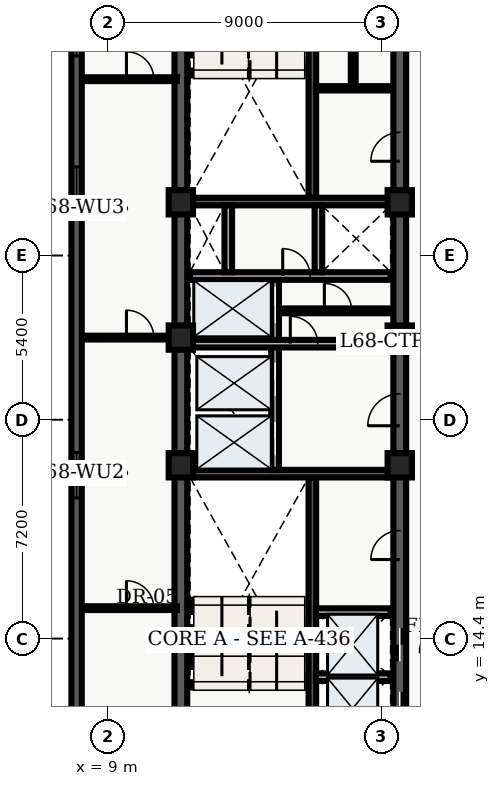
"""IFC4 building model, lengths in metres.
Left out: names, types, materials, properties, quantities, classifications, styles, units other than length and angle.
Written with IfcOpenShell. Run it as: python <this file> out.ifc"""

import sys

from ifc_helpers import new_model, entity, si_unit, converted_unit, direction, frame, origin_with_axes, origin_2d_with_axis, place, context, subcontext, project, spatial, polyline, rectangle, outline, extrude, element, fill, save


model = new_model("IFC4")
c1 = context("Model", 3, precision=1e-05, world=origin_with_axes(), true_north=direction((0.0, 1.0)))
c2 = subcontext(c1, "Body", "Model", "MODEL_VIEW")
j1 = project(units=[si_unit("LENGTHUNIT", "METRE"), converted_unit("PLANEANGLEUNIT", "DEGREE", entity("IfcPlaneAngleMeasure", 0.017), si_unit("PLANEANGLEUNIT", "RADIAN"), dimensions=[0, 0, 0, 0, 0, 0, 0])], contexts=[c1])
p1 = place(None, origin_with_axes())
s1 = spatial("IfcSite", under=j1, at=p1, CompositionType="ELEMENT")
p2 = place(p1, origin_with_axes())
s2 = spatial("IfcBuilding", under=s1, at=p2, CompositionType="ELEMENT")
p3 = place(p2, frame((0.0, 0.0, 276.3), z_axis=(0.0, 0.0, 1.0), x_axis=(1.0, 0.0, 0.0)))
s3 = spatial("IfcBuildingStorey", under=s2, at=p3, CompositionType="ELEMENT", Elevation=276.3)
p4 = place(p3, frame((11.4, 10.8, 0.0), z_axis=(0.0, 0.0, 1.0), x_axis=(0.0, 1.0, 0.0)))
e1 = element("IfcWall", 1, at=p4, inside=s3, PredefinedType="SHEAR", context=c2, shape_type="SweptSolid", body=[
    extrude(outline(polyline([(0.0, -0.21), (27.0, -0.21), (27.0, 0.21), (0.0, 0.21), (0.0, -0.21)])), origin_with_axes(), (0.0, 0.0, 1.0), 3.66),
])
p5 = place(p3, frame((18.6, 10.8, 0.0), z_axis=(0.0, 0.0, 1.0), x_axis=(0.0, 1.0, 0.0)))
e2 = element("IfcWall", 2, at=p5, inside=s3, PredefinedType="SHEAR", context=c2, shape_type="SweptSolid", body=[
    extrude(outline(polyline([(0.0, -0.21), (13.5, -0.21), (13.5, 0.21), (0.0, 0.21), (0.0, -0.21)])), origin_with_axes(), (0.0, 0.0, 1.0), 3.66),
])
p6 = place(p5, frame((1.3, 0.0, 0.0), z_axis=(0.0, 0.0, 1.0), x_axis=(1.0, 0.0, 0.0)))
e3 = element("IfcOpeningElement", 3, at=p6, cuts=e2, PredefinedType="OPENING", context=c2, shape_type="SweptSolid", body=[
    extrude(rectangle(XDim=1.1, YDim=0.44, at=origin_2d_with_axis()), origin_with_axes(), (0.0, 0.0, 1.0), 2.15),
])
p7 = place(p5, frame((3.4, 0.0, 0.0), z_axis=(0.0, 0.0, 1.0), x_axis=(1.0, 0.0, 0.0)))
e4 = element("IfcOpeningElement", 4, at=p7, cuts=e2, PredefinedType="OPENING", context=c2, shape_type="SweptSolid", body=[
    extrude(rectangle(XDim=1.1, YDim=0.44, at=origin_2d_with_axis()), origin_with_axes(), (0.0, 0.0, 1.0), 2.15),
])
p8 = place(p5, frame((11.125, 0.0, 0.0), z_axis=(0.0, 0.0, 1.0), x_axis=(1.0, 0.0, 0.0)))
e5 = element("IfcOpeningElement", 5, at=p8, cuts=e2, PredefinedType="OPENING", context=c2, shape_type="SweptSolid", body=[
    extrude(rectangle(XDim=1.05, YDim=0.44, at=origin_2d_with_axis()), origin_with_axes(), (0.0, 0.0, 1.0), 2.15),
])
p9 = place(p5, frame((6.675, 0.0, 0.0), z_axis=(0.0, 0.0, 1.0), x_axis=(1.0, 0.0, 0.0)))
e6 = element("IfcOpeningElement", 6, at=p9, cuts=e2, PredefinedType="OPENING", context=c2, shape_type="SweptSolid", body=[
    extrude(rectangle(XDim=0.95, YDim=0.44, at=origin_2d_with_axis()), origin_with_axes(), (0.0, 0.0, 1.0), 2.15),
])
p10 = place(p3, frame((18.6, 24.3, 0.0), z_axis=(0.0, 0.0, 1.0), x_axis=(0.0, 1.0, 0.0)))
e7 = element("IfcWall", 7, at=p10, inside=s3, PredefinedType="SHEAR", context=c2, shape_type="SweptSolid", body=[
    extrude(outline(polyline([(0.0, -0.21), (13.5, -0.21), (13.5, 0.21), (0.0, 0.21), (0.0, -0.21)])), origin_with_axes(), (0.0, 0.0, 1.0), 3.66),
])
p11 = place(p10, frame((6.275, 0.0, 0.0), z_axis=(0.0, 0.0, 1.0), x_axis=(1.0, 0.0, 0.0)))
e8 = element("IfcOpeningElement", 8, at=p11, cuts=e7, PredefinedType="OPENING", context=c2, shape_type="SweptSolid", body=[
    extrude(rectangle(XDim=0.95, YDim=0.44, at=origin_2d_with_axis()), origin_with_axes(), (0.0, 0.0, 1.0), 2.15),
])
p12 = place(p10, frame((10.875, 0.0, 0.0), z_axis=(0.0, 0.0, 1.0), x_axis=(1.0, 0.0, 0.0)))
e9 = element("IfcOpeningElement", 9, at=p12, cuts=e7, PredefinedType="OPENING", context=c2, shape_type="SweptSolid", body=[
    extrude(rectangle(XDim=0.95, YDim=0.44, at=origin_2d_with_axis()), origin_with_axes(), (0.0, 0.0, 1.0), 2.15),
])
p13 = place(p3, frame((15.725, 11.01, 0.0), z_axis=(0.0, 0.0, 1.0), x_axis=(0.0, 1.0, 0.0)))
e10 = element("IfcWall", 10, at=p13, inside=s3, PredefinedType="SHEAR", context=c2, shape_type="SweptSolid", body=[
    extrude(outline(polyline([(0.0, -0.125), (8.69, -0.125), (8.69, 0.125), (0.0, 0.125), (0.0, -0.125)])), origin_with_axes(), (0.0, 0.0, 1.0), 3.66),
])
p14 = place(p3, frame((11.61, 19.825, 0.0), z_axis=(0.0, 0.0, 1.0), x_axis=(1.0, 0.0, 0.0)))
e11 = element("IfcWall", 11, at=p14, inside=s3, PredefinedType="SHEAR", context=c2, shape_type="SweptSolid", body=[
    extrude(outline(polyline([(0.0, -0.125), (6.78, -0.125), (6.78, 0.125), (0.0, 0.125), (0.0, -0.125)])), origin_with_axes(), (0.0, 0.0, 1.0), 3.66),
])
p15 = place(p3, frame((15.725, 28.9, 0.0), z_axis=(0.0, 0.0, 1.0), x_axis=(0.0, 1.0, 0.0)))
e12 = element("IfcWall", 12, at=p15, inside=s3, PredefinedType="SHEAR", context=c2, shape_type="SweptSolid", body=[
    extrude(outline(polyline([(0.0, -0.125), (8.69, -0.125), (8.69, 0.125), (0.0, 0.125), (0.0, -0.125)])), origin_with_axes(), (0.0, 0.0, 1.0), 3.66),
])
p16 = place(p3, frame((11.61, 28.775, 0.0), z_axis=(0.0, 0.0, 1.0), x_axis=(1.0, 0.0, 0.0)))
e13 = element("IfcWall", 13, at=p16, inside=s3, PredefinedType="SHEAR", context=c2, shape_type="SweptSolid", body=[
    extrude(outline(polyline([(0.0, -0.125), (6.78, -0.125), (6.78, 0.125), (0.0, 0.125), (0.0, -0.125)])), origin_with_axes(), (0.0, 0.0, 1.0), 3.66),
])
p17 = place(p3, frame((14.5, 19.95, 0.0), z_axis=(0.0, 0.0, 1.0), x_axis=(0.0, 1.0, 0.0)))
e14 = element("IfcWall", 14, at=p17, inside=s3, PredefinedType="SOLIDWALL", context=c2, shape_type="SweptSolid", body=[
    extrude(outline(polyline([(0.0, -0.125), (6.25, -0.125), (6.25, 0.125), (0.0, 0.125), (0.0, -0.125)])), origin_with_axes(), (0.0, 0.0, 1.0), 2.7),
])
p18 = place(p17, frame((1.025, 0.0, 0.0), z_axis=(0.0, 0.0, 1.0), x_axis=(1.0, 0.0, 0.0)))
e15 = element("IfcOpeningElement", 15, at=p18, cuts=e14, PredefinedType="OPENING", context=c2, shape_type="SweptSolid", body=[
    extrude(rectangle(XDim=1.1, YDim=0.27, at=origin_2d_with_axis()), origin_with_axes(), (0.0, 0.0, 1.0), 2.15),
])
p19 = place(p17, frame((2.975, 0.0, 0.0), z_axis=(0.0, 0.0, 1.0), x_axis=(1.0, 0.0, 0.0)))
e16 = element("IfcOpeningElement", 16, at=p19, cuts=e14, PredefinedType="OPENING", context=c2, shape_type="SweptSolid", body=[
    extrude(rectangle(XDim=1.1, YDim=0.27, at=origin_2d_with_axis()), origin_with_axes(), (0.0, 0.0, 1.0), 2.15),
])
p20 = place(p17, frame((5.425, 0.0, 0.0), z_axis=(0.0, 0.0, 1.0), x_axis=(1.0, 0.0, 0.0)))
e17 = element("IfcOpeningElement", 17, at=p20, cuts=e14, PredefinedType="OPENING", context=c2, shape_type="SweptSolid", body=[
    extrude(rectangle(XDim=1.2, YDim=0.27, at=origin_2d_with_axis()), origin_with_axes(), (0.0, 0.0, 1.0), 2.15),
])
p21 = place(p3, frame((11.7, 24.1, 0.0), z_axis=(0.0, 0.0, 1.0), x_axis=(1.0, 0.0, 0.0)))
e18 = element("IfcWall", 18, at=p21, inside=s3, PredefinedType="SOLIDWALL", context=c2, shape_type="SweptSolid", body=[
    extrude(outline(polyline([(0.0, -0.125), (6.6, -0.125), (6.6, 0.125), (0.0, 0.125), (0.0, -0.125)])), origin_with_axes(), (0.0, 0.0, 1.0), 2.7),
])
p22 = place(p21, frame((3.75, 0.0, 0.0), z_axis=(0.0, 0.0, 1.0), x_axis=(1.0, 0.0, 0.0)))
e19 = element("IfcOpeningElement", 19, at=p22, cuts=e18, PredefinedType="OPENING", context=c2, shape_type="SweptSolid", body=[
    extrude(rectangle(XDim=0.9, YDim=0.27, at=origin_2d_with_axis()), origin_with_axes(), (0.0, 0.0, 1.0), 2.15),
])
p23 = place(p3, frame((11.7, 26.325, 0.0), z_axis=(0.0, 0.0, 1.0), x_axis=(1.0, 0.0, 0.0)))
e20 = element("IfcWall", 20, at=p23, inside=s3, PredefinedType="SOLIDWALL", context=c2, shape_type="SweptSolid", body=[
    extrude(outline(polyline([(0.0, -0.125), (6.6, -0.125), (6.6, 0.125), (0.0, 0.125), (0.0, -0.125)])), origin_with_axes(), (0.0, 0.0, 1.0), 2.7),
])
p24 = place(p23, frame((3.5, 0.0, 0.0), z_axis=(0.0, 0.0, 1.0), x_axis=(1.0, 0.0, 0.0)))
e21 = element("IfcOpeningElement", 21, at=p24, cuts=e20, PredefinedType="OPENING", context=c2, shape_type="SweptSolid", body=[
    extrude(rectangle(XDim=0.9, YDim=0.27, at=origin_2d_with_axis()), origin_with_axes(), (0.0, 0.0, 1.0), 2.15),
])
for number, where, z_axis, x_axis in (
    (22, (12.96, 26.45, 0.0), (0.0, 0.0, 1.0), (0.0, 1.0, 0.0)),
    (23, (15.925, 26.45, 0.0), (0.0, 0.0, 1.0), (0.0, 1.0, 0.0)),
):
    element("IfcWall", number, at=place(p3, frame(where, z_axis=z_axis, x_axis=x_axis)), inside=s3, PredefinedType="SOLIDWALL", context=c2, shape_type="SweptSolid", body=[
        extrude(outline(polyline([(0.0, -0.125), (2.2, -0.125), (2.2, 0.125), (0.0, 0.125), (0.0, -0.125)])), origin_with_axes(), (0.0, 0.0, 1.0), 2.7),
    ])
for number, where, z_axis, x_axis in (
    (24, (11.4, 20.1, 0.0), (0.0, 0.0, 1.0), (1.0, 0.0, 0.0)),
    (25, (11.4, 24.3, 0.0), (0.0, 0.0, 1.0), (1.0, 0.0, 0.0)),
    (26, (11.4, 28.75, 0.0), (0.0, 0.0, 1.0), (1.0, 0.0, 0.0)),
    (27, (18.6, 20.1, 0.0), (0.0, 0.0, 1.0), (1.0, 0.0, 0.0)),
    (28, (18.6, 24.3, 0.0), (0.0, 0.0, 1.0), (1.0, 0.0, 0.0)),
    (29, (18.6, 28.75, 0.0), (0.0, 0.0, 1.0), (1.0, 0.0, 0.0)),
):
    element("IfcColumn", number, at=place(p3, frame(where, z_axis=z_axis, x_axis=x_axis)), inside=s3, PredefinedType="COLUMN", context=c2, shape_type="SweptSolid", body=[
        extrude(rectangle(XDim=0.8, YDim=0.8, at=origin_2d_with_axis()), origin_with_axes(), (0.0, 0.0, 1.0), 3.9),
    ])
p25 = place(p3, frame((14.62, 25.18, 0.0), z_axis=(0.0, 0.0, 1.0), x_axis=(1.0, 0.0, 0.0)))
e30 = element("IfcWall", 30, at=p25, inside=s3, PredefinedType="PARTITIONING", context=c2, shape_type="SweptSolid", body=[
    extrude(outline(polyline([(0.0, -0.08), (3.68, -0.08), (3.68, 0.08), (0.0, 0.08), (0.0, -0.08)])), origin_with_axes(), (0.0, 0.0, 1.0), 2.7),
])
p26 = place(p25, frame((1.95, 0.0, 0.0), z_axis=(0.0, 0.0, 1.0), x_axis=(1.0, 0.0, 0.0)))
e31 = element("IfcOpeningElement", 31, at=p26, cuts=e30, PredefinedType="OPENING", context=c2, shape_type="SweptSolid", body=[
    extrude(rectangle(XDim=0.9, YDim=0.18, at=origin_2d_with_axis()), origin_with_axes(), (0.0, 0.0, 1.0), 2.15),
])
for number, where, z_axis, x_axis in (
    (32, (15.84, 13.13, 0.0), (0.0, 0.0, 1.0), (1.0, 0.0, 0.0)),
    (33, (15.84, 15.27, 0.0), (0.0, 0.0, 1.0), (1.0, 0.0, 0.0)),
):
    element("IfcWall", number, at=place(p3, frame(where, z_axis=z_axis, x_axis=x_axis)), inside=s3, PredefinedType="SOLIDWALL", context=c2, shape_type="SweptSolid", body=[
        extrude(outline(polyline([(0.0, -0.125), (2.46, -0.125), (2.46, 0.125), (0.0, 0.125), (0.0, -0.125)])), origin_with_axes(), (0.0, 0.0, 1.0), 2.7),
    ])
p27 = place(p3, frame((15.84, 32.5, 0.0), z_axis=(0.0, 0.0, 1.0), x_axis=(1.0, 0.0, 0.0)))
e34 = element("IfcWall", 34, at=p27, inside=s3, PredefinedType="PARTITIONING", context=c2, shape_type="SweptSolid", body=[
    extrude(outline(polyline([(0.0, -0.07), (2.46, -0.07), (2.46, 0.07), (0.0, 0.07), (0.0, -0.07)])), origin_with_axes(), (0.0, 0.0, 1.0), 2.7),
])
p28 = place(p3, frame((17.07, 32.58, 0.0), z_axis=(0.0, 0.0, 1.0), x_axis=(0.0, 1.0, 0.0)))
e35 = element("IfcWall", 35, at=p28, inside=s3, PredefinedType="PARTITIONING", context=c2, shape_type="SweptSolid", body=[
    extrude(outline(polyline([(0.0, -0.08), (4.92, -0.08), (4.92, 0.08), (0.0, 0.08), (0.0, -0.08)])), origin_with_axes(), (0.0, 0.0, 1.0), 2.7),
])
p29 = place(p28, frame((2.45, 0.0, 0.0), z_axis=(0.0, 0.0, 1.0), x_axis=(1.0, 0.0, 0.0)))
e36 = element("IfcOpeningElement", 36, at=p29, cuts=e35, PredefinedType="OPENING", context=c2, shape_type="SweptSolid", body=[
    extrude(rectangle(XDim=0.9, YDim=0.18, at=origin_2d_with_axis()), origin_with_axes(), (0.0, 0.0, 1.0), 2.15),
])
p30 = place(p3, frame((8.135, 15.4, 0.0), z_axis=(0.0, 0.0, 1.0), x_axis=(1.0, 0.0, 0.0)))
e37 = element("IfcWall", 37, at=p30, inside=s3, PredefinedType="PARTITIONING", context=c2, shape_type="SweptSolid", body=[
    extrude(outline(polyline([(0.0, -0.062), (3.135, -0.062), (3.135, 0.062), (0.0, 0.062), (0.0, -0.062)])), origin_with_axes(), (0.0, 0.0, 1.0), 2.7),
])
p31 = place(p30, frame((1.925, 0.0, 0.0), z_axis=(0.0, 0.0, 1.0), x_axis=(1.0, 0.0, 0.0)))
e38 = element("IfcOpeningElement", 38, at=p31, cuts=e37, PredefinedType="OPENING", context=c2, shape_type="SweptSolid", body=[
    extrude(rectangle(XDim=0.9, YDim=0.145, at=origin_2d_with_axis()), origin_with_axes(), (0.0, 0.0, 1.0), 2.15),
])
p32 = place(p3, frame((8.135, 24.3, 0.0), z_axis=(0.0, 0.0, 1.0), x_axis=(1.0, 0.0, 0.0)))
e39 = element("IfcWall", 39, at=p32, inside=s3, PredefinedType="PARTITIONING", context=c2, shape_type="SweptSolid", body=[
    extrude(outline(polyline([(0.0, -0.062), (3.135, -0.062), (3.135, 0.062), (0.0, 0.062), (0.0, -0.062)])), origin_with_axes(), (0.0, 0.0, 1.0), 2.7),
])
p33 = place(p32, frame((1.925, 0.0, 0.0), z_axis=(0.0, 0.0, 1.0), x_axis=(1.0, 0.0, 0.0)))
e40 = element("IfcOpeningElement", 40, at=p33, cuts=e39, PredefinedType="OPENING", context=c2, shape_type="SweptSolid", body=[
    extrude(rectangle(XDim=0.9, YDim=0.145, at=origin_2d_with_axis()), origin_with_axes(), (0.0, 0.0, 1.0), 2.15),
])
p34 = place(p3, frame((8.135, 32.8, 0.0), z_axis=(0.0, 0.0, 1.0), x_axis=(1.0, 0.0, 0.0)))
e41 = element("IfcWall", 41, at=p34, inside=s3, PredefinedType="PARTITIONING", context=c2, shape_type="SweptSolid", body=[
    extrude(outline(polyline([(0.0, -0.062), (3.135, -0.062), (3.135, 0.062), (0.0, 0.062), (0.0, -0.062)])), origin_with_axes(), (0.0, 0.0, 1.0), 2.7),
])
p35 = place(p34, frame((1.925, 0.0, 0.0), z_axis=(0.0, 0.0, 1.0), x_axis=(1.0, 0.0, 0.0)))
e42 = element("IfcOpeningElement", 42, at=p35, cuts=e41, PredefinedType="OPENING", context=c2, shape_type="SweptSolid", body=[
    extrude(rectangle(XDim=0.9, YDim=0.145, at=origin_2d_with_axis()), origin_with_axes(), (0.0, 0.0, 1.0), 2.15),
])
p36 = place(p3, frame((7.97, 2.74, 0.0), z_axis=(0.0, 0.0, 1.0), x_axis=(0.0, 1.0, 0.0)))
e43 = element("IfcWall", 43, at=p36, inside=s3, PredefinedType="SOLIDWALL", context=c2, shape_type="SweptSolid", body=[
    extrude(outline(polyline([(0.0, -0.17), (43.46, -0.17), (43.46, 0.17), (0.0, 0.17), (0.0, -0.17)])), origin_with_axes(), (0.0, 0.0, 1.0), 3.66),
])
p37 = place(p36, frame((2.948, 0.0, 0.45), z_axis=(0.0, 0.0, 1.0), x_axis=(1.0, 0.0, 0.0)))
e44 = element("IfcOpeningElement", 44, at=p37, cuts=e43, PredefinedType="OPENING", context=c2, shape_type="SweptSolid", body=[
    extrude(rectangle(XDim=1.5, YDim=0.36, at=origin_2d_with_axis()), origin_with_axes(), (0.0, 0.0, 1.0), 2.1),
])
p38 = place(p36, frame((7.643, 0.0, 0.45), z_axis=(0.0, 0.0, 1.0), x_axis=(1.0, 0.0, 0.0)))
e45 = element("IfcOpeningElement", 45, at=p38, cuts=e43, PredefinedType="OPENING", context=c2, shape_type="SweptSolid", body=[
    extrude(rectangle(XDim=1.5, YDim=0.36, at=origin_2d_with_axis()), origin_with_axes(), (0.0, 0.0, 1.0), 2.1),
])
p39 = place(p36, frame((17.034, 0.0, 0.45), z_axis=(0.0, 0.0, 1.0), x_axis=(1.0, 0.0, 0.0)))
e46 = element("IfcOpeningElement", 46, at=p39, cuts=e43, PredefinedType="OPENING", context=c2, shape_type="SweptSolid", body=[
    extrude(rectangle(XDim=1.5, YDim=0.36, at=origin_2d_with_axis()), origin_with_axes(), (0.0, 0.0, 1.0), 2.1),
])
p40 = place(p36, frame((26.426, 0.0, 0.45), z_axis=(0.0, 0.0, 1.0), x_axis=(1.0, 0.0, 0.0)))
e47 = element("IfcOpeningElement", 47, at=p40, cuts=e43, PredefinedType="OPENING", context=c2, shape_type="SweptSolid", body=[
    extrude(rectangle(XDim=1.5, YDim=0.36, at=origin_2d_with_axis()), origin_with_axes(), (0.0, 0.0, 1.0), 2.1),
])
p41 = place(p36, frame((31.571, 0.0, 0.45), z_axis=(0.0, 0.0, 1.0), x_axis=(1.0, 0.0, 0.0)))
e48 = element("IfcOpeningElement", 48, at=p41, cuts=e43, PredefinedType="OPENING", context=c2, shape_type="SweptSolid", body=[
    extrude(rectangle(XDim=1.5, YDim=0.36, at=origin_2d_with_axis()), origin_with_axes(), (0.0, 0.0, 1.0), 2.1),
])
p42 = place(p36, frame((35.817, 0.0, 0.45), z_axis=(0.0, 0.0, 1.0), x_axis=(1.0, 0.0, 0.0)))
e49 = element("IfcOpeningElement", 49, at=p42, cuts=e43, PredefinedType="OPENING", context=c2, shape_type="SweptSolid", body=[
    extrude(rectangle(XDim=1.5, YDim=0.36, at=origin_2d_with_axis()), origin_with_axes(), (0.0, 0.0, 1.0), 2.1),
])
p43 = place(p36, frame((40.512, 0.0, 0.45), z_axis=(0.0, 0.0, 1.0), x_axis=(1.0, 0.0, 0.0)))
e50 = element("IfcOpeningElement", 50, at=p43, cuts=e43, PredefinedType="OPENING", context=c2, shape_type="SweptSolid", body=[
    extrude(rectangle(XDim=1.5, YDim=0.36, at=origin_2d_with_axis()), origin_with_axes(), (0.0, 0.0, 1.0), 2.1),
])
p44 = place(p5, frame((1.3, 0.0, 0.0), z_axis=(0.0, 0.0, 1.0), x_axis=(1.0, 0.0, 0.0)))
e51 = element("IfcDoor", 51, at=p44, inside=s3, OperationType="SLIDING_TO_LEFT", PredefinedType="DOOR", context=c2, shape_type="SweptSolid", body=[
    extrude(rectangle(XDim=1.1, YDim=0.09, at=origin_2d_with_axis()), origin_with_axes(), (0.0, 0.0, 1.0), 2.15),
])
fill(e3, e51)
p45 = place(p5, frame((3.4, 0.0, 0.0), z_axis=(0.0, 0.0, 1.0), x_axis=(1.0, 0.0, 0.0)))
e52 = element("IfcDoor", 52, at=p45, inside=s3, OperationType="SLIDING_TO_RIGHT", PredefinedType="DOOR", context=c2, shape_type="SweptSolid", body=[
    extrude(rectangle(XDim=1.1, YDim=0.09, at=origin_2d_with_axis()), origin_with_axes(), (0.0, 0.0, 1.0), 2.15),
])
fill(e4, e52)
p46 = place(p17, frame((1.025, 0.0, 0.0), z_axis=(0.0, 0.0, 1.0), x_axis=(1.0, 0.0, 0.0)))
e53 = element("IfcDoor", 53, at=p46, inside=s3, OperationType="SLIDING_TO_LEFT", PredefinedType="DOOR", context=c2, shape_type="SweptSolid", body=[
    extrude(rectangle(XDim=1.1, YDim=0.09, at=origin_2d_with_axis()), origin_with_axes(), (0.0, 0.0, 1.0), 2.15),
])
fill(e15, e53)
p47 = place(p17, frame((2.975, 0.0, 0.0), z_axis=(0.0, 0.0, 1.0), x_axis=(1.0, 0.0, 0.0)))
e54 = element("IfcDoor", 54, at=p47, inside=s3, OperationType="SLIDING_TO_RIGHT", PredefinedType="DOOR", context=c2, shape_type="SweptSolid", body=[
    extrude(rectangle(XDim=1.1, YDim=0.09, at=origin_2d_with_axis()), origin_with_axes(), (0.0, 0.0, 1.0), 2.15),
])
fill(e16, e54)
p48 = place(p17, frame((5.425, 0.0, 0.0), z_axis=(0.0, 0.0, 1.0), x_axis=(1.0, 0.0, 0.0)))
e55 = element("IfcDoor", 55, at=p48, inside=s3, OperationType="DOUBLE_DOOR_SLIDING", PredefinedType="DOOR", context=c2, shape_type="SweptSolid", body=[
    extrude(rectangle(XDim=1.2, YDim=0.09, at=origin_2d_with_axis()), origin_with_axes(), (0.0, 0.0, 1.0), 2.15),
])
fill(e17, e55)
p49 = place(p5, frame((11.125, 0.0, 0.0), z_axis=(0.0, 0.0, 1.0), x_axis=(1.0, 0.0, 0.0)))
e56 = element("IfcDoor", 56, at=p49, inside=s3, OperationType="SINGLE_SWING_LEFT", PredefinedType="DOOR", context=c2, shape_type="SweptSolid", body=[
    extrude(rectangle(XDim=1.05, YDim=0.09, at=origin_2d_with_axis()), origin_with_axes(), (0.0, 0.0, 1.0), 2.15),
])
fill(e5, e56)
p50 = place(p23, frame((3.5, 0.0, 0.0), z_axis=(0.0, 0.0, 1.0), x_axis=(1.0, 0.0, 0.0)))
e57 = element("IfcDoor", 57, at=p50, inside=s3, OperationType="SINGLE_SWING_LEFT", PredefinedType="DOOR", context=c2, shape_type="SweptSolid", body=[
    extrude(rectangle(XDim=0.9, YDim=0.09, at=origin_2d_with_axis()), origin_with_axes(), (0.0, 0.0, 1.0), 2.15),
])
fill(e21, e57)
p51 = place(p21, frame((3.75, 0.0, 0.0), z_axis=(0.0, 0.0, 1.0), x_axis=(1.0, 0.0, 0.0)))
e58 = element("IfcDoor", 58, at=p51, inside=s3, OperationType="SINGLE_SWING_LEFT", PredefinedType="DOOR", context=c2, shape_type="SweptSolid", body=[
    extrude(rectangle(XDim=0.9, YDim=0.09, at=origin_2d_with_axis()), origin_with_axes(), (0.0, 0.0, 1.0), 2.15),
])
fill(e19, e58)
p52 = place(p25, frame((1.95, 0.0, 0.0), z_axis=(0.0, 0.0, 1.0), x_axis=(1.0, 0.0, 0.0)))
e59 = element("IfcDoor", 59, at=p52, inside=s3, OperationType="SINGLE_SWING_LEFT", PredefinedType="DOOR", context=c2, shape_type="SweptSolid", body=[
    extrude(rectangle(XDim=0.9, YDim=0.09, at=origin_2d_with_axis()), origin_with_axes(), (0.0, 0.0, 1.0), 2.15),
])
fill(e31, e59)
p53 = place(p5, frame((6.675, 0.0, 0.0), z_axis=(0.0, 0.0, 1.0), x_axis=(1.0, 0.0, 0.0)))
e60 = element("IfcDoor", 60, at=p53, inside=s3, OperationType="SINGLE_SWING_LEFT", PredefinedType="DOOR", context=c2, shape_type="SweptSolid", body=[
    extrude(rectangle(XDim=0.95, YDim=0.09, at=origin_2d_with_axis()), origin_with_axes(), (0.0, 0.0, 1.0), 2.15),
])
fill(e6, e60)
p54 = place(p10, frame((6.275, 0.0, 0.0), z_axis=(0.0, 0.0, 1.0), x_axis=(1.0, 0.0, 0.0)))
e61 = element("IfcDoor", 61, at=p54, inside=s3, OperationType="SINGLE_SWING_LEFT", PredefinedType="DOOR", context=c2, shape_type="SweptSolid", body=[
    extrude(rectangle(XDim=0.95, YDim=0.09, at=origin_2d_with_axis()), origin_with_axes(), (0.0, 0.0, 1.0), 2.15),
])
fill(e8, e61)
p55 = place(p30, frame((1.925, 0.0, 0.0), z_axis=(0.0, 0.0, 1.0), x_axis=(1.0, 0.0, 0.0)))
e62 = element("IfcDoor", 62, at=p55, inside=s3, OperationType="SINGLE_SWING_LEFT", PredefinedType="DOOR", context=c2, shape_type="SweptSolid", body=[
    extrude(rectangle(XDim=0.9, YDim=0.075, at=origin_2d_with_axis()), origin_with_axes(), (0.0, 0.0, 1.0), 2.15),
])
fill(e38, e62)
p56 = place(p32, frame((1.925, 0.0, 0.0), z_axis=(0.0, 0.0, 1.0), x_axis=(1.0, 0.0, 0.0)))
e63 = element("IfcDoor", 63, at=p56, inside=s3, OperationType="SINGLE_SWING_LEFT", PredefinedType="DOOR", context=c2, shape_type="SweptSolid", body=[
    extrude(rectangle(XDim=0.9, YDim=0.075, at=origin_2d_with_axis()), origin_with_axes(), (0.0, 0.0, 1.0), 2.15),
])
fill(e40, e63)
p57 = place(p34, frame((1.925, 0.0, 0.0), z_axis=(0.0, 0.0, 1.0), x_axis=(1.0, 0.0, 0.0)))
e64 = element("IfcDoor", 64, at=p57, inside=s3, OperationType="SINGLE_SWING_LEFT", PredefinedType="DOOR", context=c2, shape_type="SweptSolid", body=[
    extrude(rectangle(XDim=0.9, YDim=0.075, at=origin_2d_with_axis()), origin_with_axes(), (0.0, 0.0, 1.0), 2.15),
])
fill(e42, e64)
p58 = place(p36, frame((17.034, 0.0, 0.45), z_axis=(0.0, 0.0, 1.0), x_axis=(1.0, 0.0, 0.0)))
e65 = element("IfcWindow", 65, at=p58, inside=s3, PredefinedType="WINDOW", context=c2, shape_type="SweptSolid", body=[
    extrude(rectangle(XDim=1.5, YDim=0.09, at=origin_2d_with_axis()), origin_with_axes(), (0.0, 0.0, 1.0), 2.1),
])
fill(e46, e65)
p59 = place(p36, frame((26.426, 0.0, 0.45), z_axis=(0.0, 0.0, 1.0), x_axis=(1.0, 0.0, 0.0)))
e66 = element("IfcWindow", 66, at=p59, inside=s3, PredefinedType="WINDOW", context=c2, shape_type="SweptSolid", body=[
    extrude(rectangle(XDim=1.5, YDim=0.09, at=origin_2d_with_axis()), origin_with_axes(), (0.0, 0.0, 1.0), 2.1),
])
fill(e47, e66)
p60 = place(p36, frame((31.571, 0.0, 0.45), z_axis=(0.0, 0.0, 1.0), x_axis=(1.0, 0.0, 0.0)))
e67 = element("IfcWindow", 67, at=p60, inside=s3, PredefinedType="WINDOW", context=c2, shape_type="SweptSolid", body=[
    extrude(rectangle(XDim=1.5, YDim=0.09, at=origin_2d_with_axis()), origin_with_axes(), (0.0, 0.0, 1.0), 2.1),
])
fill(e48, e67)
save(model, sys.argv[1])
